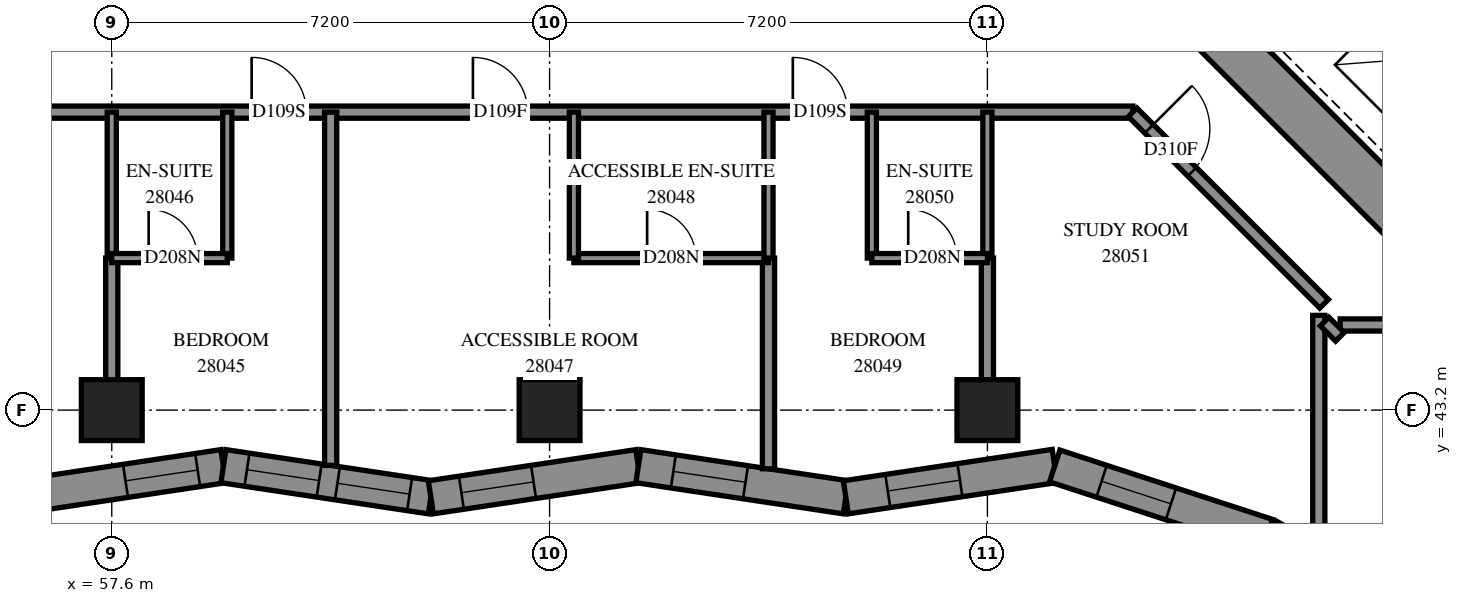
"""IFC4 building model, lengths in metres.
Left out: names, types, materials, properties, quantities, classifications, styles, units other than length and angle.
Written with IfcOpenShell. Run it as: python <this file> out.ifc"""

import sys

from ifc_helpers import new_model, si_unit, direction, frame, frame_2d, origin, origin_2d, place, context, subcontext, project, spatial, polyline, rectangle, outline, extrude, element, fill, save


model = new_model("IFC4")
c1 = context("Model", 3, precision=1e-05, world=origin(), true_north=direction((0.0, 1.0)))
c2 = subcontext(c1, "Body", "Model", "MODEL_VIEW")
j1 = project(units=[si_unit("LENGTHUNIT", "METRE"), si_unit("PLANEANGLEUNIT", "RADIAN")], contexts=[c1])
p1 = place(None, origin())
s1 = spatial("IfcSite", under=j1, at=p1, CompositionType="ELEMENT")
p2 = place(p1, origin())
s2 = spatial("IfcBuilding", under=s1, at=p2, CompositionType="ELEMENT")
p3 = place(p2, frame((0.0, 0.0, 105.0)))
s3 = spatial("IfcBuildingStorey", under=s2, at=p3, CompositionType="ELEMENT", Elevation=105.0)
for number, where, z_axis, x_axis in (
    (1, (57.6, 43.2, 0.0), (0.0, 0.0, 1.0), (1.0, 0.0, 0.0)),
    (2, (64.8, 43.2, 0.0), (0.0, 0.0, 1.0), (1.0, 0.0, 0.0)),
    (3, (72.0, 43.2, 0.0), (0.0, 0.0, 1.0), (1.0, 0.0, 0.0)),
):
    element("IfcColumn", number, at=place(p3, frame(where, z_axis=z_axis, x_axis=x_axis)), inside=s3, PredefinedType="COLUMN", context=c2, shape_type="SweptSolid", body=[
        extrude(rectangle(XDim=1.0, YDim=1.0, at=origin_2d()), origin(), (0.0, 0.0, 1.0), 3.1),
    ])
p4 = place(p3, frame((75.806, 49.373, -0.3), z_axis=(0.0, 0.0, 1.0), x_axis=(0.7071067812, -0.7071067812, 0.0)))
e4 = element("IfcWall", 4, at=p4, inside=s3, PredefinedType="SHEAR", context=c2, shape_type="SweptSolid", body=[
    extrude(rectangle(XDim=16.0, YDim=0.8, at=frame_2d((8.0, 0.0))), origin(), (0.0, 0.0, 1.0), 2.7),
])
p5 = place(p3, frame((56.024, 41.766, 0.0), z_axis=(0.0, 0.0, 1.0), x_axis=(0.9889272091, 0.1484013984, 0.0)))
e5 = element("IfcWall", 5, at=p5, inside=s3, PredefinedType="SOLIDWALL", context=c2, shape_type="SweptSolid", body=[
    extrude(outline(polyline([(-0.041, -0.275), (3.409, -0.275), (3.491, 0.275), (0.041, 0.275), (-0.041, -0.275)])), origin(), (0.0, 0.0, 1.0), 3.1),
])
p6 = place(p5, frame((1.822, 0.0, 0.5)))
e6 = element("IfcOpeningElement", 6, at=p6, cuts=e5, PredefinedType="OPENING", context=c2, shape_type="SweptSolid", body=[
    extrude(rectangle(XDim=1.2, YDim=2.45, at=frame_2d((0.6, 1.225))), frame((0.0, 0.285, 0.0), z_axis=(0.0, -1.0, 0.0), x_axis=(1.0, 0.0, 0.0)), (0.0, 0.0, 1.0), 0.57),
])
p7 = place(p3, frame((59.436, 42.278, 0.0), z_axis=(0.0, 0.0, 1.0), x_axis=(0.9889272091, -0.1484013984, 0.0)))
e7 = element("IfcWall", 7, at=p7, inside=s3, PredefinedType="SOLIDWALL", context=c2, shape_type="SweptSolid", body=[
    extrude(outline(polyline([(0.041, -0.275), (3.491, -0.275), (3.409, 0.275), (-0.041, 0.275), (0.041, -0.275)])), origin(), (0.0, 0.0, 1.0), 3.1),
])
p8 = place(p7, frame((0.392, 0.0, 0.5)))
e8 = element("IfcOpeningElement", 8, at=p8, cuts=e7, PredefinedType="OPENING", context=c2, shape_type="SweptSolid", body=[
    extrude(rectangle(XDim=1.2, YDim=2.45, at=frame_2d((0.6, 1.225))), frame((0.0, 0.285, 0.0), z_axis=(0.0, -1.0, 0.0), x_axis=(1.0, 0.0, 0.0)), (0.0, 0.0, 1.0), 0.57),
])
p9 = place(p7, frame((1.896, 0.0, 0.5)))
e9 = element("IfcOpeningElement", 9, at=p9, cuts=e7, PredefinedType="OPENING", context=c2, shape_type="SweptSolid", body=[
    extrude(rectangle(XDim=1.2, YDim=2.45, at=frame_2d((0.6, 1.225))), frame((0.0, 0.285, 0.0), z_axis=(0.0, -1.0, 0.0), x_axis=(1.0, 0.0, 0.0)), (0.0, 0.0, 1.0), 0.57),
])
p10 = place(p3, frame((62.848, 41.766, 0.0), z_axis=(0.0, 0.0, 1.0), x_axis=(0.9889278474, 0.1483971447, 0.0)))
e10 = element("IfcWall", 10, at=p10, inside=s3, PredefinedType="SOLIDWALL", context=c2, shape_type="SweptSolid", body=[
    extrude(outline(polyline([(-0.041, -0.275), (3.409, -0.275), (3.491, 0.275), (0.041, 0.275), (-0.041, -0.275)])), origin(), (0.0, 0.0, 1.0), 3.1),
])
p11 = place(p10, frame((0.508, 0.0, 0.5)))
e11 = element("IfcOpeningElement", 11, at=p11, cuts=e10, PredefinedType="OPENING", context=c2, shape_type="SweptSolid", body=[
    extrude(rectangle(XDim=1.2, YDim=2.45, at=frame_2d((0.6, 1.225))), frame((0.0, 0.285, 0.0), z_axis=(0.0, -1.0, 0.0), x_axis=(1.0, 0.0, 0.0)), (0.0, 0.0, 1.0), 0.57),
])
p12 = place(p3, frame((66.26, 42.278, 0.0), z_axis=(0.0, 0.0, 1.0), x_axis=(0.9889272091, -0.1484013984, 0.0)))
e12 = element("IfcWall", 12, at=p12, inside=s3, PredefinedType="SOLIDWALL", context=c2, shape_type="SweptSolid", body=[
    extrude(outline(polyline([(0.041, -0.275), (3.491, -0.275), (3.409, 0.275), (-0.041, 0.275), (0.041, -0.275)])), origin(), (0.0, 0.0, 1.0), 3.1),
])
p13 = place(p12, frame((0.582, 0.0, 0.5)))
e13 = element("IfcOpeningElement", 13, at=p13, cuts=e12, PredefinedType="OPENING", context=c2, shape_type="SweptSolid", body=[
    extrude(rectangle(XDim=1.2, YDim=2.45, at=frame_2d((0.6, 1.225))), frame((0.0, 0.285, 0.0), z_axis=(0.0, -1.0, 0.0), x_axis=(1.0, 0.0, 0.0)), (0.0, 0.0, 1.0), 0.57),
])
p14 = place(p3, frame((69.671, 41.766, 0.0), z_axis=(0.0, 0.0, 1.0), x_axis=(0.9889276939, 0.1483981679, 0.0)))
e14 = element("IfcWall", 14, at=p14, inside=s3, PredefinedType="SOLIDWALL", context=c2, shape_type="SweptSolid", body=[
    extrude(outline(polyline([(-0.041, -0.275), (3.409, -0.275), (3.539, 0.275), (0.041, 0.275), (-0.041, -0.275)])), origin(), (0.0, 0.0, 1.0), 3.1),
])
p15 = place(p14, frame((0.698, 0.0, 0.5)))
e15 = element("IfcOpeningElement", 15, at=p15, cuts=e14, PredefinedType="OPENING", context=c2, shape_type="SweptSolid", body=[
    extrude(rectangle(XDim=1.2, YDim=2.45, at=frame_2d((0.6, 1.225))), frame((0.0, 0.285, 0.0), z_axis=(0.0, -1.0, 0.0), x_axis=(1.0, 0.0, 0.0)), (0.0, 0.0, 1.0), 0.57),
])
p16 = place(p3, frame((73.107, 42.282, 0.0), z_axis=(0.0, 0.0, 1.0), x_axis=(0.9507759642, -0.309879115, 0.0)))
e16 = element("IfcWall", 16, at=p16, inside=s3, PredefinedType="SOLIDWALL", context=c2, shape_type="SweptSolid", body=[
    extrude(outline(polyline([(0.065, -0.275), (3.654, -0.275), (3.707, 0.275), (-0.065, 0.275), (0.065, -0.275)])), origin(), (0.0, 0.0, 1.0), 3.1),
])
p17 = place(p16, frame((0.811, 0.0, 0.5)))
e17 = element("IfcOpeningElement", 17, at=p17, cuts=e16, PredefinedType="OPENING", context=c2, shape_type="SweptSolid", body=[
    extrude(rectangle(XDim=1.2, YDim=2.45, at=frame_2d((0.6, 1.225))), frame((0.0, 0.285, 0.0), z_axis=(0.0, -1.0, 0.0), x_axis=(1.0, 0.0, 0.0)), (0.0, 0.0, 1.0), 0.57),
])
p18 = place(p3, frame((76.606, 41.141, 0.0), z_axis=(0.0, 0.0, 1.0), x_axis=(0.8726248074, -0.4883911809, 0.0)))
e18 = element("IfcWall", 18, at=p18, inside=s3, PredefinedType="SOLIDWALL", context=c2, shape_type="SweptSolid", body=[
    extrude(outline(polyline([(0.027, -0.275), (4.12, -0.275), (4.233, 0.275), (-0.027, 0.275), (0.027, -0.275)])), origin(), (0.0, 0.0, 1.0), 3.1),
])
p19 = place(p18, frame((0.338, 0.0, 0.5)))
e19 = element("IfcOpeningElement", 19, at=p19, cuts=e18, PredefinedType="OPENING", context=c2, shape_type="SweptSolid", body=[
    extrude(rectangle(XDim=1.2, YDim=2.45, at=frame_2d((0.6, 1.225))), frame((0.0, 0.285, 0.0), z_axis=(0.0, -1.0, 0.0), x_axis=(1.0, 0.0, 0.0)), (0.0, 0.0, 1.0), 0.57),
])
p20 = place(p18, frame((2.227, 0.0, 0.5)))
e20 = element("IfcOpeningElement", 20, at=p20, cuts=e18, PredefinedType="OPENING", context=c2, shape_type="SweptSolid", body=[
    extrude(rectangle(XDim=1.2, YDim=2.45, at=frame_2d((0.6, 1.225))), frame((0.0, 0.285, 0.0), z_axis=(0.0, -1.0, 0.0), x_axis=(1.0, 0.0, 0.0)), (0.0, 0.0, 1.0), 0.57),
])
p21 = place(p3, frame((55.3, 48.1, 0.0), z_axis=(0.0, 0.0, 1.0), x_axis=(1.0, 0.0, 0.0)))
e21 = element("IfcWall", 21, at=p21, inside=s3, PredefinedType="PARTITIONING", context=c2, shape_type="SweptSolid", body=[
    extrude(rectangle(XDim=19.092, YDim=0.2, at=frame_2d((9.546, 0.0))), origin(), (0.0, 0.0, 1.0), 3.1),
])
p22 = place(p21, frame((4.6, 0.0, 0.0)))
e22 = element("IfcOpeningElement", 22, at=p22, cuts=e21, PredefinedType="OPENING", context=c2, shape_type="SweptSolid", body=[
    extrude(rectangle(XDim=0.9, YDim=2.1, at=frame_2d((0.45, 1.05))), frame((0.0, 0.11, 0.0), z_axis=(0.0, -1.0, 0.0), x_axis=(1.0, 0.0, 0.0)), (0.0, 0.0, 1.0), 0.22),
])
p23 = place(p21, frame((8.239, 0.0, 0.0)))
e23 = element("IfcOpeningElement", 23, at=p23, cuts=e21, PredefinedType="OPENING", context=c2, shape_type="SweptSolid", body=[
    extrude(rectangle(XDim=0.9, YDim=2.1, at=frame_2d((0.45, 1.05))), frame((0.0, 0.11, 0.0), z_axis=(0.0, -1.0, 0.0), x_axis=(1.0, 0.0, 0.0)), (0.0, 0.0, 1.0), 0.22),
])
p24 = place(p21, frame((13.5, 0.0, 0.0)))
e24 = element("IfcOpeningElement", 24, at=p24, cuts=e21, PredefinedType="OPENING", context=c2, shape_type="SweptSolid", body=[
    extrude(rectangle(XDim=0.9, YDim=2.1, at=frame_2d((0.45, 1.05))), frame((0.0, 0.11, 0.0), z_axis=(0.0, -1.0, 0.0), x_axis=(1.0, 0.0, 0.0)), (0.0, 0.0, 1.0), 0.22),
])
p25 = place(p3, frame((61.2, 42.291, 0.0), z_axis=(0.0, 0.0, 1.0), x_axis=(0.0, 1.0, 0.0)))
e25 = element("IfcWall", 25, at=p25, inside=s3, PredefinedType="PARTITIONING", context=c2, shape_type="SweptSolid", body=[
    extrude(rectangle(XDim=5.809, YDim=0.2, at=frame_2d((2.904, 0.0))), origin(), (0.0, 0.0, 1.0), 3.1),
])
p26 = place(p3, frame((74.388, 48.096, 0.0), z_axis=(0.0, 0.0, 1.0), x_axis=(0.7071067812, -0.7071067812, 0.0)))
e26 = element("IfcWall", 26, at=p26, inside=s3, PredefinedType="PARTITIONING", context=c2, shape_type="SweptSolid", body=[
    extrude(rectangle(XDim=4.452, YDim=0.2, at=frame_2d((2.226, 0.0))), origin(), (0.0, 0.0, 1.0), 3.1),
])
p27 = place(p26, frame((0.382, 0.0, 0.0)))
e27 = element("IfcOpeningElement", 27, at=p27, cuts=e26, PredefinedType="OPENING", context=c2, shape_type="SweptSolid", body=[
    extrude(rectangle(XDim=1.0, YDim=2.1, at=frame_2d((0.5, 1.05))), frame((0.0, 0.11, 0.0), z_axis=(0.0, -1.0, 0.0), x_axis=(1.0, 0.0, 0.0)), (0.0, 0.0, 1.0), 0.22),
])
p28 = place(p3, frame((77.45, 40.984, 0.0), z_axis=(0.0, 0.0, 1.0), x_axis=(0.0, 1.0, 0.0)))
e28 = element("IfcWall", 28, at=p28, inside=s3, PredefinedType="PARTITIONING", context=c2, shape_type="SweptSolid", body=[
    extrude(rectangle(XDim=3.774, YDim=0.2, at=frame_2d((1.887, 0.0))), origin(), (0.0, 0.0, 1.0), 3.1),
])
p29 = place(p3, frame((68.4, 42.235, 0.0), z_axis=(0.0, 0.0, 1.0), x_axis=(0.0, 1.0, 0.0)))
e29 = element("IfcWall", 29, at=p29, inside=s3, PredefinedType="PARTITIONING", context=c2, shape_type="SweptSolid", body=[
    extrude(rectangle(XDim=3.465, YDim=0.2, at=frame_2d((1.732, 0.0))), origin(), (0.0, 0.0, 1.0), 3.1),
])
p30 = place(p3, frame((65.2, 45.7, 0.0), z_axis=(0.0, 0.0, 1.0), x_axis=(1.0, 0.0, 0.0)))
e30 = element("IfcWall", 30, at=p30, inside=s3, PredefinedType="PARTITIONING", context=c2, shape_type="SweptSolid", body=[
    extrude(rectangle(XDim=3.2, YDim=0.15, at=frame_2d((1.6, 0.0))), origin(), (0.0, 0.0, 1.0), 3.1),
])
p31 = place(p30, frame((1.204, 0.0, 0.0)))
e31 = element("IfcOpeningElement", 31, at=p31, cuts=e30, PredefinedType="OPENING", context=c2, shape_type="SweptSolid", body=[
    extrude(rectangle(XDim=0.8, YDim=2.1, at=frame_2d((0.4, 1.05))), frame((0.0, 0.085, 0.0), z_axis=(0.0, -1.0, 0.0), x_axis=(1.0, 0.0, 0.0)), (0.0, 0.0, 1.0), 0.17),
])
for number, where, z_axis, x_axis in (
    (32, (59.5, 45.7, 0.0), (0.0, 0.0, 1.0), (0.0, 1.0, 0.0)),
    (33, (57.6, 45.7, 0.0), (0.0, 0.0, 1.0), (0.0, 1.0, 0.0)),
    (34, (65.2, 45.7, 0.0), (0.0, 0.0, 1.0), (0.0, 1.0, 0.0)),
    (35, (68.4, 45.7, 0.0), (0.0, 0.0, 1.0), (0.0, 1.0, 0.0)),
    (36, (70.1, 45.7, 0.0), (0.0, 0.0, 1.0), (0.0, 1.0, 0.0)),
    (37, (72.0, 45.7, 0.0), (0.0, 0.0, 1.0), (0.0, 1.0, 0.0)),
):
    element("IfcWall", number, at=place(p3, frame(where, z_axis=z_axis, x_axis=x_axis)), inside=s3, PredefinedType="PARTITIONING", context=c2, shape_type="SweptSolid", body=[
        extrude(rectangle(XDim=2.4, YDim=0.15, at=frame_2d((1.2, 0.0))), origin(), (0.0, 0.0, 1.0), 3.1),
    ])
p32 = place(p3, frame((77.802, 44.6, 0.0), z_axis=(0.0, 0.0, 1.0), x_axis=(1.0, 0.0, 0.0)))
e38 = element("IfcWall", 38, at=p32, inside=s3, PredefinedType="PARTITIONING", context=c2, shape_type="SweptSolid", body=[
    extrude(rectangle(XDim=2.098, YDim=0.2, at=frame_2d((1.049, 0.0))), origin(), (0.0, 0.0, 1.0), 3.1),
])
for number, where, z_axis, x_axis in (
    (39, (57.6, 43.7, 0.0), (0.0, 0.0, 1.0), (0.0, 1.0, 0.0)),
    (40, (72.0, 43.7, 0.0), (0.0, 0.0, 1.0), (0.0, 1.0, 0.0)),
):
    element("IfcWall", number, at=place(p3, frame(where, z_axis=z_axis, x_axis=x_axis)), inside=s3, PredefinedType="PARTITIONING", context=c2, shape_type="SweptSolid", body=[
        extrude(rectangle(XDim=2.0, YDim=0.2, at=frame_2d((1.0, 0.0))), origin(), (0.0, 0.0, 1.0), 3.1),
    ])
p33 = place(p3, frame((70.1, 45.7, 0.0), z_axis=(0.0, 0.0, 1.0), x_axis=(1.0, 0.0, 0.0)))
e41 = element("IfcWall", 41, at=p33, inside=s3, PredefinedType="PARTITIONING", context=c2, shape_type="SweptSolid", body=[
    extrude(rectangle(XDim=1.9, YDim=0.15, at=frame_2d((0.95, 0.0))), origin(), (0.0, 0.0, 1.0), 3.1),
])
p34 = place(p33, frame((0.598, 0.0, 0.0)))
e42 = element("IfcOpeningElement", 42, at=p34, cuts=e41, PredefinedType="OPENING", context=c2, shape_type="SweptSolid", body=[
    extrude(rectangle(XDim=0.8, YDim=2.1, at=frame_2d((0.4, 1.05))), frame((0.0, 0.085, 0.0), z_axis=(0.0, -1.0, 0.0), x_axis=(1.0, 0.0, 0.0)), (0.0, 0.0, 1.0), 0.17),
])
p35 = place(p3, frame((57.6, 45.7, 0.0), z_axis=(0.0, 0.0, 1.0), x_axis=(1.0, 0.0, 0.0)))
e43 = element("IfcWall", 43, at=p35, inside=s3, PredefinedType="PARTITIONING", context=c2, shape_type="SweptSolid", body=[
    extrude(rectangle(XDim=1.9, YDim=0.15, at=frame_2d((0.95, 0.0))), origin(), (0.0, 0.0, 1.0), 3.1),
])
p36 = place(p35, frame((0.607, 0.0, 0.0)))
e44 = element("IfcOpeningElement", 44, at=p36, cuts=e43, PredefinedType="OPENING", context=c2, shape_type="SweptSolid", body=[
    extrude(rectangle(XDim=0.8, YDim=2.1, at=frame_2d((0.4, 1.05))), frame((0.0, 0.085, 0.0), z_axis=(0.0, -1.0, 0.0), x_axis=(1.0, 0.0, 0.0)), (0.0, 0.0, 1.0), 0.17),
])
p37 = place(p3, frame((78.27, 40.525, 0.0), z_axis=(0.0, 0.0, 1.0), x_axis=(0.7071449836, 0.7070685768, 0.0)))
e45 = element("IfcWall", 45, at=p37, inside=s3, PredefinedType="PARTITIONING", context=c2, shape_type="SweptSolid", body=[
    extrude(rectangle(XDim=1.309, YDim=0.2, at=frame_2d((0.654, 0.0))), origin(), (0.0, 0.0, 1.0), 3.1),
])
p38 = place(p3, frame((77.546, 44.656, 0.0), z_axis=(0.0, 0.0, 1.0), x_axis=(0.7071067812, -0.7071067812, 0.0)))
e46 = element("IfcWall", 46, at=p38, inside=s3, PredefinedType="PARTITIONING", context=c2, shape_type="SweptSolid", body=[
    extrude(rectangle(XDim=0.355, YDim=0.2, at=frame_2d((0.177, 0.0))), origin(), (0.0, 0.0, 1.0), 3.1),
])
p39 = place(p6, origin())
e47 = element("IfcWindow", 47, at=p39, inside=s3, PartitioningType="SINGLE_PANEL", PredefinedType="WINDOW", context=c2, shape_type="SweptSolid", body=[
    extrude(rectangle(XDim=1.2, YDim=2.45, at=frame_2d((0.6, 1.225))), frame((0.0, 0.155, 0.0), z_axis=(0.0, -1.0, 0.0), x_axis=(1.0, 0.0, 0.0)), (0.0, 0.0, 1.0), 0.06),
])
fill(e6, e47)
p40 = place(p8, origin())
e48 = element("IfcWindow", 48, at=p40, inside=s3, PartitioningType="SINGLE_PANEL", PredefinedType="WINDOW", context=c2, shape_type="SweptSolid", body=[
    extrude(rectangle(XDim=1.2, YDim=2.45, at=frame_2d((0.6, 1.225))), frame((0.0, 0.155, 0.0), z_axis=(0.0, -1.0, 0.0), x_axis=(1.0, 0.0, 0.0)), (0.0, 0.0, 1.0), 0.06),
])
fill(e8, e48)
p41 = place(p9, origin())
e49 = element("IfcWindow", 49, at=p41, inside=s3, PartitioningType="SINGLE_PANEL", PredefinedType="WINDOW", context=c2, shape_type="SweptSolid", body=[
    extrude(rectangle(XDim=1.2, YDim=2.45, at=frame_2d((0.6, 1.225))), frame((0.0, 0.155, 0.0), z_axis=(0.0, -1.0, 0.0), x_axis=(1.0, 0.0, 0.0)), (0.0, 0.0, 1.0), 0.06),
])
fill(e9, e49)
p42 = place(p11, origin())
e50 = element("IfcWindow", 50, at=p42, inside=s3, PartitioningType="SINGLE_PANEL", PredefinedType="WINDOW", context=c2, shape_type="SweptSolid", body=[
    extrude(rectangle(XDim=1.2, YDim=2.45, at=frame_2d((0.6, 1.225))), frame((0.0, 0.155, 0.0), z_axis=(0.0, -1.0, 0.0), x_axis=(1.0, 0.0, 0.0)), (0.0, 0.0, 1.0), 0.06),
])
fill(e11, e50)
p43 = place(p13, origin())
e51 = element("IfcWindow", 51, at=p43, inside=s3, PartitioningType="SINGLE_PANEL", PredefinedType="WINDOW", context=c2, shape_type="SweptSolid", body=[
    extrude(rectangle(XDim=1.2, YDim=2.45, at=frame_2d((0.6, 1.225))), frame((0.0, 0.155, 0.0), z_axis=(0.0, -1.0, 0.0), x_axis=(1.0, 0.0, 0.0)), (0.0, 0.0, 1.0), 0.06),
])
fill(e13, e51)
p44 = place(p15, origin())
e52 = element("IfcWindow", 52, at=p44, inside=s3, PartitioningType="SINGLE_PANEL", PredefinedType="WINDOW", context=c2, shape_type="SweptSolid", body=[
    extrude(rectangle(XDim=1.2, YDim=2.45, at=frame_2d((0.6, 1.225))), frame((0.0, 0.155, 0.0), z_axis=(0.0, -1.0, 0.0), x_axis=(1.0, 0.0, 0.0)), (0.0, 0.0, 1.0), 0.06),
])
fill(e15, e52)
p45 = place(p17, origin())
e53 = element("IfcWindow", 53, at=p45, inside=s3, PartitioningType="SINGLE_PANEL", PredefinedType="WINDOW", context=c2, shape_type="SweptSolid", body=[
    extrude(rectangle(XDim=1.2, YDim=2.45, at=frame_2d((0.6, 1.225))), frame((0.0, 0.155, 0.0), z_axis=(0.0, -1.0, 0.0), x_axis=(1.0, 0.0, 0.0)), (0.0, 0.0, 1.0), 0.06),
])
fill(e17, e53)
p46 = place(p22, origin())
e54 = element("IfcDoor", 54, at=p46, inside=s3, OperationType="SINGLE_SWING_LEFT", PredefinedType="DOOR", context=c2, shape_type="SweptSolid", body=[
    extrude(rectangle(XDim=0.9, YDim=2.1, at=frame_2d((0.45, 1.05))), frame((0.0, 0.025, 0.0), z_axis=(0.0, -1.0, 0.0), x_axis=(1.0, 0.0, 0.0)), (0.0, 0.0, 1.0), 0.05),
])
fill(e22, e54)
p47 = place(p36, origin())
e55 = element("IfcDoor", 55, at=p47, inside=s3, OperationType="SINGLE_SWING_RIGHT", PredefinedType="DOOR", context=c2, shape_type="SweptSolid", body=[
    extrude(rectangle(XDim=0.8, YDim=2.1, at=frame_2d((0.4, 1.05))), frame((0.0, 0.025, 0.0), z_axis=(0.0, -1.0, 0.0), x_axis=(1.0, 0.0, 0.0)), (0.0, 0.0, 1.0), 0.05),
])
fill(e44, e55)
p48 = place(p23, origin())
e56 = element("IfcDoor", 56, at=p48, inside=s3, OperationType="SINGLE_SWING_RIGHT", PredefinedType="DOOR", context=c2, shape_type="SweptSolid", body=[
    extrude(rectangle(XDim=0.9, YDim=2.1, at=frame_2d((0.45, 1.05))), frame((0.0, 0.025, 0.0), z_axis=(0.0, -1.0, 0.0), x_axis=(1.0, 0.0, 0.0)), (0.0, 0.0, 1.0), 0.05),
])
fill(e23, e56)
p49 = place(p31, origin())
e57 = element("IfcDoor", 57, at=p49, inside=s3, OperationType="SINGLE_SWING_RIGHT", PredefinedType="DOOR", context=c2, shape_type="SweptSolid", body=[
    extrude(rectangle(XDim=0.8, YDim=2.1, at=frame_2d((0.4, 1.05))), frame((0.0, 0.025, 0.0), z_axis=(0.0, -1.0, 0.0), x_axis=(1.0, 0.0, 0.0)), (0.0, 0.0, 1.0), 0.05),
])
fill(e31, e57)
p50 = place(p24, origin())
e58 = element("IfcDoor", 58, at=p50, inside=s3, OperationType="SINGLE_SWING_RIGHT", PredefinedType="DOOR", context=c2, shape_type="SweptSolid", body=[
    extrude(rectangle(XDim=0.9, YDim=2.1, at=frame_2d((0.45, 1.05))), frame((0.0, 0.025, 0.0), z_axis=(0.0, -1.0, 0.0), x_axis=(1.0, 0.0, 0.0)), (0.0, 0.0, 1.0), 0.05),
])
fill(e24, e58)
p51 = place(p34, origin())
e59 = element("IfcDoor", 59, at=p51, inside=s3, OperationType="SINGLE_SWING_RIGHT", PredefinedType="DOOR", context=c2, shape_type="SweptSolid", body=[
    extrude(rectangle(XDim=0.8, YDim=2.1, at=frame_2d((0.4, 1.05))), frame((0.0, 0.025, 0.0), z_axis=(0.0, -1.0, 0.0), x_axis=(1.0, 0.0, 0.0)), (0.0, 0.0, 1.0), 0.05),
])
fill(e42, e59)
p52 = place(p27, origin())
e60 = element("IfcDoor", 60, at=p52, inside=s3, OperationType="SINGLE_SWING_LEFT", PredefinedType="DOOR", context=c2, shape_type="SweptSolid", body=[
    extrude(rectangle(XDim=1.0, YDim=2.1, at=frame_2d((0.5, 1.05))), frame((0.0, 0.025, 0.0), z_axis=(0.0, -1.0, 0.0), x_axis=(1.0, 0.0, 0.0)), (0.0, 0.0, 1.0), 0.05),
])
fill(e27, e60)
save(model, sys.argv[1])
